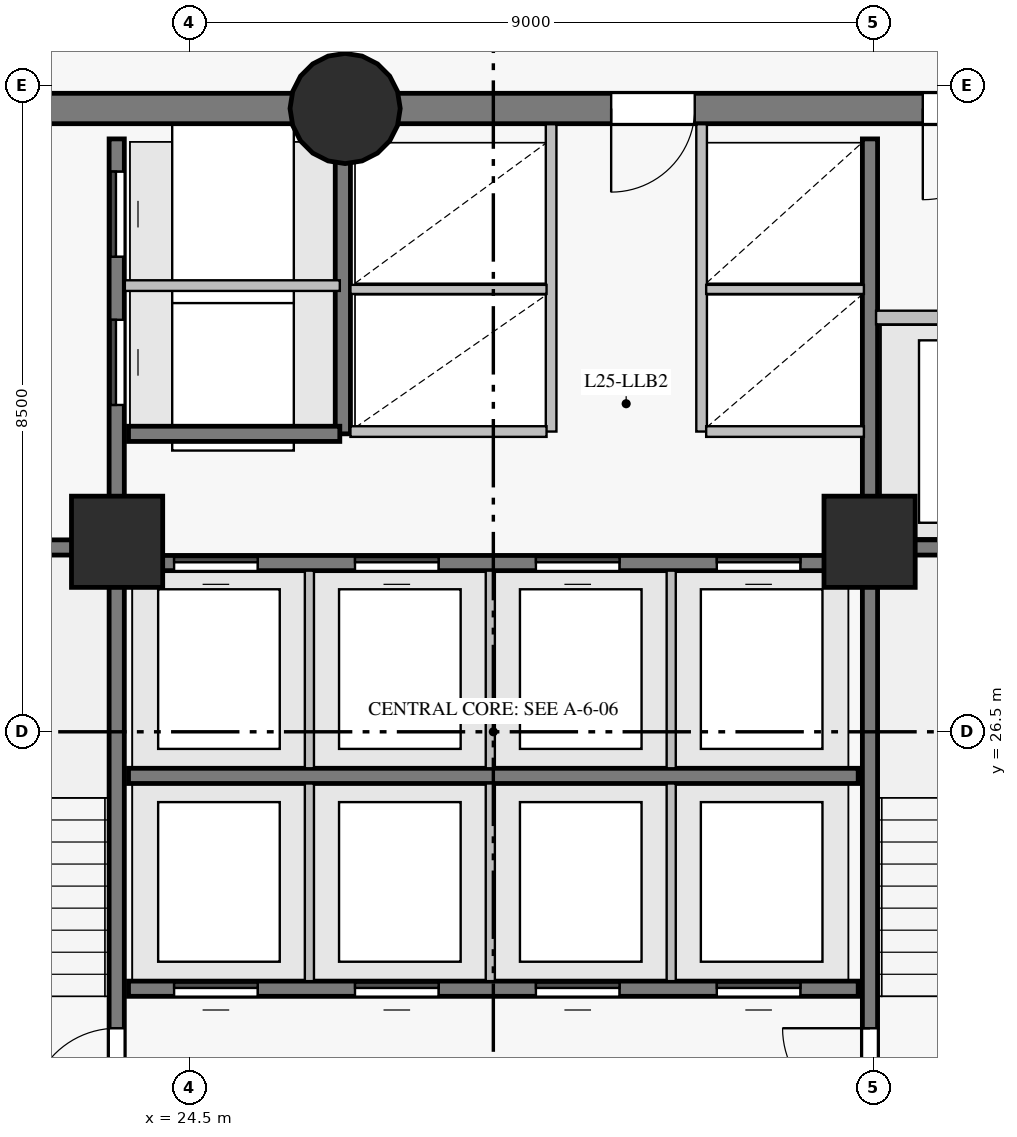
"""IFC4 building model, lengths in metres.
Left out: names, types, materials, properties, quantities, classifications, styles, units other than length and angle.
Written with IfcOpenShell. Run it as: python <this file> out.ifc"""

import sys

from ifc_helpers import new_model, si_unit, direction, frame, frame_2d, origin, origin_with_axes, origin_2d, place, context, subcontext, project, spatial, rectangle, circle, extrude, source, transform, mapped, element, fill, save


model = new_model("IFC4")
c1 = context("Model", 3, precision=1e-05, world=origin(), true_north=direction((0.0, 1.0)))
c2 = subcontext(c1, "Body", "Model", "MODEL_VIEW")
j1 = project(units=[si_unit("LENGTHUNIT", "METRE"), si_unit("PLANEANGLEUNIT", "RADIAN")], contexts=[c1])
p1 = place(None, origin())
s1 = spatial("IfcSite", under=j1, at=p1, CompositionType="ELEMENT")
p2 = place(p1, origin())
s2 = spatial("IfcBuilding", under=s1, at=p2, CompositionType="ELEMENT")
p3 = place(p2, frame((0.0, 0.0, 96.2)))
s3 = spatial("IfcBuildingStorey", under=s2, at=p3, CompositionType="ELEMENT", Elevation=96.2)
p4 = place(p3, frame((37.5, 34.7, 0.0), z_axis=(0.0, 0.0, 1.0), x_axis=(-1.0, 0.0, 0.0)))
e1 = element("IfcWall", 1, at=p4, inside=s3, PredefinedType="SHEAR", context=c2, shape_type="SweptSolid", body=[
    extrude(rectangle(XDim=10.95, YDim=0.4, at=frame_2d((5.475, 0.0))), origin(), (0.0, 0.0, 1.0), 2.825),
])
p5 = place(p4, frame((2.15, 0.0, 0.0)))
e2 = element("IfcOpeningElement", 2, at=p5, cuts=e1, PredefinedType="OPENING", context=c2, shape_type="SweptSolid", body=[
    extrude(rectangle(XDim=1.2, YDim=2.15, at=frame_2d((0.6, 1.075))), frame((0.0, 0.21, 0.0), z_axis=(0.0, -1.0, 0.0), x_axis=(1.0, 0.0, 0.0)), (0.0, 0.0, 1.0), 0.42),
])
p6 = place(p4, frame((6.35, 0.0, 0.0)))
e3 = element("IfcOpeningElement", 3, at=p6, cuts=e1, PredefinedType="OPENING", context=c2, shape_type="SweptSolid", body=[
    extrude(rectangle(XDim=1.1, YDim=2.15, at=frame_2d((0.55, 1.075))), frame((0.0, 0.21, 0.0), z_axis=(0.0, -1.0, 0.0), x_axis=(1.0, 0.0, 0.0)), (0.0, 0.0, 1.0), 0.42),
])
p7 = place(p3, frame((26.55, 34.7, 0.0), z_axis=(0.0, 0.0, 1.0), x_axis=(-1.0, 0.0, 0.0)))
e4 = element("IfcWall", 4, at=p7, inside=s3, PredefinedType="SHEAR", context=c2, shape_type="SweptSolid", body=[
    extrude(rectangle(XDim=7.05, YDim=0.4, at=frame_2d((3.525, 0.0))), origin(), (0.0, 0.0, 1.0), 2.825),
])
p8 = place(p7, frame((4.25, 0.0, 0.0)))
e5 = element("IfcOpeningElement", 5, at=p8, cuts=e4, PredefinedType="OPENING", context=c2, shape_type="SweptSolid", body=[
    extrude(rectangle(XDim=1.1, YDim=2.15, at=frame_2d((0.55, 1.075))), frame((0.0, 0.21, 0.0), z_axis=(0.0, -1.0, 0.0), x_axis=(1.0, 0.0, 0.0)), (0.0, 0.0, 1.0), 0.42),
])
m1 = source(origin_with_axes(), c2, "Body", "SweptSolid", [
    extrude(circle(Radius=0.725, at=origin_2d()), origin(), (0.0, 0.0, 1.0), 3.05),
])
p9 = place(p3, frame((26.55, 34.7, 0.0), z_axis=(0.0, 0.0, 1.0), x_axis=(1.0, 0.0, 0.0)))
e6 = element("IfcColumn", 6, at=p9, inside=s3, PredefinedType="COLUMN", context=c2, shape_type="MappedRepresentation", body=[
    mapped(m1, transform((0.0, 0.0, 0.0), scale=1.0)),
])
m2 = source(origin_with_axes(), c2, "Body", "SweptSolid", [
    extrude(rectangle(XDim=1.2, YDim=1.2, at=origin_2d()), origin(), (0.0, 0.0, 1.0), 3.05),
])
for number, where, z_axis, x_axis in (
    (7, (23.55, 29.0, 0.0), (0.0, 0.0, 1.0), (1.0, 0.0, 0.0)),
    (8, (33.45, 29.0, 0.0), (0.0, 0.0, 1.0), (1.0, 0.0, 0.0)),
):
    element("IfcColumn", number, at=place(p3, frame(where, z_axis=z_axis, x_axis=x_axis)), inside=s3, PredefinedType="COLUMN", context=c2, shape_type="MappedRepresentation", body=[
        mapped(m2, transform((0.0, 0.0, 0.0), scale=1.0)),
    ])
p10 = place(p3, frame((23.545, 18.7, 0.0), z_axis=(0.0, 0.0, 1.0), x_axis=(0.0, 1.0, 0.0)))
e9 = element("IfcWall", 9, at=p10, inside=s3, PredefinedType="SHEAR", context=c2, shape_type="SweptSolid", body=[
    extrude(rectangle(XDim=15.6, YDim=0.2, at=frame_2d((7.8, 0.0))), origin(), (0.0, 0.0, 1.0), 2.825),
])
p11 = place(p10, frame((2.75, 0.0, 0.0)))
e10 = element("IfcOpeningElement", 10, at=p11, cuts=e9, PredefinedType="OPENING", context=c2, shape_type="SweptSolid", body=[
    extrude(rectangle(XDim=1.15, YDim=2.15, at=frame_2d((0.575, 1.075))), frame((0.0, 0.11, 0.0), z_axis=(0.0, -1.0, 0.0), x_axis=(1.0, 0.0, 0.0)), (0.0, 0.0, 1.0), 0.22),
])
p12 = place(p10, frame((0.14, 0.0, 0.0)))
e11 = element("IfcOpeningElement", 11, at=p12, cuts=e9, PredefinedType="OPENING", context=c2, shape_type="SweptSolid", body=[
    extrude(rectangle(XDim=0.88, YDim=2.1, at=frame_2d((0.44, 1.05))), frame((0.0, 0.11, 0.0), z_axis=(0.0, -1.0, 0.0), x_axis=(1.0, 0.0, 0.0)), (0.0, 0.0, 1.0), 0.22),
])
p13 = place(p10, frame((1.36, 0.0, 0.0)))
e12 = element("IfcOpeningElement", 12, at=p13, cuts=e9, PredefinedType="OPENING", context=c2, shape_type="SweptSolid", body=[
    extrude(rectangle(XDim=0.88, YDim=2.1, at=frame_2d((0.44, 1.05))), frame((0.0, 0.11, 0.0), z_axis=(0.0, -1.0, 0.0), x_axis=(1.0, 0.0, 0.0)), (0.0, 0.0, 1.0), 0.22),
])
p14 = place(p10, frame((12.1, 0.0, 0.0)))
e13 = element("IfcOpeningElement", 13, at=p14, cuts=e9, PredefinedType="OPENING", context=c2, shape_type="SweptSolid", body=[
    extrude(rectangle(XDim=1.12, YDim=2.15, at=frame_2d((0.56, 1.075))), frame((0.0, 0.11, 0.0), z_axis=(0.0, -1.0, 0.0), x_axis=(1.0, 0.0, 0.0)), (0.0, 0.0, 1.0), 0.22),
])
p15 = place(p10, frame((14.05, 0.0, 0.0)))
e14 = element("IfcOpeningElement", 14, at=p15, cuts=e9, PredefinedType="OPENING", context=c2, shape_type="SweptSolid", body=[
    extrude(rectangle(XDim=1.12, YDim=2.15, at=frame_2d((0.56, 1.075))), frame((0.0, 0.11, 0.0), z_axis=(0.0, -1.0, 0.0), x_axis=(1.0, 0.0, 0.0)), (0.0, 0.0, 1.0), 0.22),
])
p16 = place(p3, frame((33.455, 18.7, 0.0), z_axis=(0.0, 0.0, 1.0), x_axis=(0.0, 1.0, 0.0)))
e15 = element("IfcWall", 15, at=p16, inside=s3, PredefinedType="SHEAR", context=c2, shape_type="SweptSolid", body=[
    extrude(rectangle(XDim=15.6, YDim=0.2, at=frame_2d((7.8, 0.0))), origin(), (0.0, 0.0, 1.0), 2.825),
])
p17 = place(p16, frame((2.75, 0.0, 0.0)))
e16 = element("IfcOpeningElement", 16, at=p17, cuts=e15, PredefinedType="OPENING", context=c2, shape_type="SweptSolid", body=[
    extrude(rectangle(XDim=1.15, YDim=2.15, at=frame_2d((0.575, 1.075))), frame((0.0, 0.11, 0.0), z_axis=(0.0, -1.0, 0.0), x_axis=(1.0, 0.0, 0.0)), (0.0, 0.0, 1.0), 0.22),
])
p18 = place(p16, frame((0.55, 0.0, 0.0)))
e17 = element("IfcOpeningElement", 17, at=p18, cuts=e15, PredefinedType="OPENING", context=c2, shape_type="SweptSolid", body=[
    extrude(rectangle(XDim=0.94, YDim=2.1, at=frame_2d((0.47, 1.05))), frame((0.0, 0.11, 0.0), z_axis=(0.0, -1.0, 0.0), x_axis=(1.0, 0.0, 0.0)), (0.0, 0.0, 1.0), 0.22),
])
p19 = place(p3, frame((23.7, 23.12, 0.0), z_axis=(0.0, 0.0, 1.0), x_axis=(1.0, 0.0, 0.0)))
e18 = element("IfcWall", 18, at=p19, inside=s3, PredefinedType="SHEAR", context=c2, shape_type="SweptSolid", body=[
    extrude(rectangle(XDim=9.6, YDim=0.2, at=frame_2d((4.8, 0.0))), origin(), (0.0, 0.0, 1.0), 2.825),
])
p20 = place(p19, frame((0.6, 0.0, 0.0)))
e19 = element("IfcOpeningElement", 19, at=p20, cuts=e18, PredefinedType="OPENING", context=c2, shape_type="SweptSolid", body=[
    extrude(rectangle(XDim=1.1, YDim=2.15, at=frame_2d((0.55, 1.075))), frame((0.0, 0.11, 0.0), z_axis=(0.0, -1.0, 0.0), x_axis=(1.0, 0.0, 0.0)), (0.0, 0.0, 1.0), 0.22),
])
p21 = place(p19, frame((2.98, 0.0, 0.0)))
e20 = element("IfcOpeningElement", 20, at=p21, cuts=e18, PredefinedType="OPENING", context=c2, shape_type="SweptSolid", body=[
    extrude(rectangle(XDim=1.1, YDim=2.15, at=frame_2d((0.55, 1.075))), frame((0.0, 0.11, 0.0), z_axis=(0.0, -1.0, 0.0), x_axis=(1.0, 0.0, 0.0)), (0.0, 0.0, 1.0), 0.22),
])
p22 = place(p19, frame((5.36, 0.0, 0.0)))
e21 = element("IfcOpeningElement", 21, at=p22, cuts=e18, PredefinedType="OPENING", context=c2, shape_type="SweptSolid", body=[
    extrude(rectangle(XDim=1.1, YDim=2.15, at=frame_2d((0.55, 1.075))), frame((0.0, 0.11, 0.0), z_axis=(0.0, -1.0, 0.0), x_axis=(1.0, 0.0, 0.0)), (0.0, 0.0, 1.0), 0.22),
])
p23 = place(p19, frame((7.74, 0.0, 0.0)))
e22 = element("IfcOpeningElement", 22, at=p23, cuts=e18, PredefinedType="OPENING", context=c2, shape_type="SweptSolid", body=[
    extrude(rectangle(XDim=1.1, YDim=2.15, at=frame_2d((0.55, 1.075))), frame((0.0, 0.11, 0.0), z_axis=(0.0, -1.0, 0.0), x_axis=(1.0, 0.0, 0.0)), (0.0, 0.0, 1.0), 0.22),
])
p24 = place(p3, frame((23.7, 25.92, 0.0), z_axis=(0.0, 0.0, 1.0), x_axis=(1.0, 0.0, 0.0)))
e23 = element("IfcWall", 23, at=p24, inside=s3, PredefinedType="SHEAR", context=c2, shape_type="SweptSolid", body=[
    extrude(rectangle(XDim=9.6, YDim=0.2, at=frame_2d((4.8, 0.0))), origin(), (0.0, 0.0, 1.0), 2.825),
])
p25 = place(p3, frame((23.7, 28.72, 0.0), z_axis=(0.0, 0.0, 1.0), x_axis=(1.0, 0.0, 0.0)))
e24 = element("IfcWall", 24, at=p25, inside=s3, PredefinedType="SHEAR", context=c2, shape_type="SweptSolid", body=[
    extrude(rectangle(XDim=9.6, YDim=0.2, at=frame_2d((4.8, 0.0))), origin(), (0.0, 0.0, 1.0), 2.825),
])
p26 = place(p25, frame((0.6, 0.0, 0.0)))
e25 = element("IfcOpeningElement", 25, at=p26, cuts=e24, PredefinedType="OPENING", context=c2, shape_type="SweptSolid", body=[
    extrude(rectangle(XDim=1.1, YDim=2.15, at=frame_2d((0.55, 1.075))), frame((0.0, 0.11, 0.0), z_axis=(0.0, -1.0, 0.0), x_axis=(1.0, 0.0, 0.0)), (0.0, 0.0, 1.0), 0.22),
])
p27 = place(p25, frame((2.98, 0.0, 0.0)))
e26 = element("IfcOpeningElement", 26, at=p27, cuts=e24, PredefinedType="OPENING", context=c2, shape_type="SweptSolid", body=[
    extrude(rectangle(XDim=1.1, YDim=2.15, at=frame_2d((0.55, 1.075))), frame((0.0, 0.11, 0.0), z_axis=(0.0, -1.0, 0.0), x_axis=(1.0, 0.0, 0.0)), (0.0, 0.0, 1.0), 0.22),
])
p28 = place(p25, frame((5.36, 0.0, 0.0)))
e27 = element("IfcOpeningElement", 27, at=p28, cuts=e24, PredefinedType="OPENING", context=c2, shape_type="SweptSolid", body=[
    extrude(rectangle(XDim=1.1, YDim=2.15, at=frame_2d((0.55, 1.075))), frame((0.0, 0.11, 0.0), z_axis=(0.0, -1.0, 0.0), x_axis=(1.0, 0.0, 0.0)), (0.0, 0.0, 1.0), 0.22),
])
p29 = place(p25, frame((7.74, 0.0, 0.0)))
e28 = element("IfcOpeningElement", 28, at=p29, cuts=e24, PredefinedType="OPENING", context=c2, shape_type="SweptSolid", body=[
    extrude(rectangle(XDim=1.1, YDim=2.15, at=frame_2d((0.55, 1.075))), frame((0.0, 0.11, 0.0), z_axis=(0.0, -1.0, 0.0), x_axis=(1.0, 0.0, 0.0)), (0.0, 0.0, 1.0), 0.22),
])
for number, where, z_axis, x_axis in (
    (29, (33.455, 28.925, 0.0), (0.0, 0.0, 1.0), (1.0, 0.0, 0.0)),
    (30, (19.55, 28.925, 0.0), (0.0, 0.0, 1.0), (1.0, 0.0, 0.0)),
):
    element("IfcWall", number, at=place(p3, frame(where, z_axis=z_axis, x_axis=x_axis)), inside=s3, PredefinedType="SHEAR", context=c2, shape_type="SweptSolid", body=[
        extrude(rectangle(XDim=3.995, YDim=0.2, at=frame_2d((1.998, 0.0))), origin(), (0.0, 0.0, 1.0), 2.825),
    ])
p30 = place(p3, frame((26.52, 30.42, 0.0), z_axis=(0.0, 0.0, 1.0), x_axis=(0.0, 1.0, 0.0)))
e31 = element("IfcWall", 31, at=p30, inside=s3, PredefinedType="SHEAR", context=c2, shape_type="SweptSolid", body=[
    extrude(rectangle(XDim=3.86, YDim=0.2, at=frame_2d((1.93, 0.0))), origin(), (0.0, 0.0, 1.0), 2.825),
])
p31 = place(p3, frame((23.7, 30.42, 0.0), z_axis=(0.0, 0.0, 1.0), x_axis=(1.0, 0.0, 0.0)))
e32 = element("IfcWall", 32, at=p31, inside=s3, PredefinedType="SHEAR", context=c2, shape_type="SweptSolid", body=[
    extrude(rectangle(XDim=2.78, YDim=0.2, at=frame_2d((1.39, 0.0))), origin(), (0.0, 0.0, 1.0), 2.825),
])
for number, where, z_axis, x_axis in (
    (33, (29.26, 30.45, 0.0), (0.0, 0.0, 1.0), (0.0, 1.0, 0.0)),
    (34, (31.24, 30.45, 0.0), (0.0, 0.0, 1.0), (0.0, 1.0, 0.0)),
):
    element("IfcWall", number, at=place(p3, frame(where, z_axis=z_axis, x_axis=x_axis)), inside=s3, PredefinedType="PARTITIONING", context=c2, shape_type="SweptSolid", body=[
        extrude(rectangle(XDim=4.043, YDim=0.14, at=frame_2d((2.021, 0.0))), origin(), (0.0, 0.0, 1.0), 2.825),
    ])
p32 = place(p3, frame((33.535, 31.95, 0.0), z_axis=(0.0, 0.0, 1.0), x_axis=(1.0, 0.0, 0.0)))
e35 = element("IfcWall", 35, at=p32, inside=s3, PredefinedType="PARTITIONING", context=c2, shape_type="SweptSolid", body=[
    extrude(rectangle(XDim=3.759, YDim=0.18, at=frame_2d((1.879, 0.0))), origin(), (0.0, 0.0, 1.0), 2.825),
])
p33 = place(p32, frame((0.9, 0.0, 0.0)))
e36 = element("IfcOpeningElement", 36, at=p33, cuts=e35, PredefinedType="OPENING", context=c2, shape_type="SweptSolid", body=[
    extrude(rectangle(XDim=1.3, YDim=2.2, at=frame_2d((0.65, 1.1))), frame((0.0, 0.1, 0.0), z_axis=(0.0, -1.0, 0.0), x_axis=(1.0, 0.0, 0.0)), (0.0, 0.0, 1.0), 0.2),
])
p34 = place(p3, frame((23.652, 32.37, 0.0), z_axis=(0.0, 0.0, 1.0), x_axis=(1.0, 0.0, 0.0)))
e37 = element("IfcWall", 37, at=p34, inside=s3, PredefinedType="PARTITIONING", context=c2, shape_type="SweptSolid", body=[
    extrude(rectangle(XDim=2.828, YDim=0.14, at=frame_2d((1.414, 0.0))), origin(), (0.0, 0.0, 1.0), 2.825),
])
for number, where, z_axis, x_axis in (
    (38, (26.08, 23.22, 0.0), (0.0, 0.0, 1.0), (0.0, 1.0, 0.0)),
    (39, (28.46, 23.22, 0.0), (0.0, 0.0, 1.0), (0.0, 1.0, 0.0)),
    (40, (30.84, 23.22, 0.0), (0.0, 0.0, 1.0), (0.0, 1.0, 0.0)),
    (41, (26.08, 26.02, 0.0), (0.0, 0.0, 1.0), (0.0, 1.0, 0.0)),
    (42, (28.46, 26.02, 0.0), (0.0, 0.0, 1.0), (0.0, 1.0, 0.0)),
    (43, (30.84, 26.02, 0.0), (0.0, 0.0, 1.0), (0.0, 1.0, 0.0)),
):
    element("IfcWall", number, at=place(p3, frame(where, z_axis=z_axis, x_axis=x_axis)), inside=s3, PredefinedType="PARTITIONING", context=c2, shape_type="SweptSolid", body=[
        extrude(rectangle(XDim=2.6, YDim=0.12, at=frame_2d((1.3, 0.0))), origin(), (0.0, 0.0, 1.0), 2.825),
    ])
p35 = place(p3, frame((26.62, 30.45, 0.0), z_axis=(0.0, 0.0, 1.0), x_axis=(1.0, 0.0, 0.0)))
e44 = element("IfcWall", 44, at=p35, inside=s3, PredefinedType="PARTITIONING", context=c2, shape_type="SweptSolid", body=[
    extrude(rectangle(XDim=2.58, YDim=0.14, at=frame_2d((1.29, 0.0))), origin(), (0.0, 0.0, 1.0), 2.825),
])
p36 = place(p3, frame((26.62, 32.32, 0.0), z_axis=(0.0, 0.0, 1.0), x_axis=(1.0, 0.0, 0.0)))
e45 = element("IfcWall", 45, at=p36, inside=s3, PredefinedType="PARTITIONING", context=c2, shape_type="SweptSolid", body=[
    extrude(rectangle(XDim=2.58, YDim=0.12, at=frame_2d((1.29, 0.0))), origin(), (0.0, 0.0, 1.0), 2.825),
])
p37 = place(p3, frame((31.3, 30.45, 0.0), z_axis=(0.0, 0.0, 1.0), x_axis=(1.0, 0.0, 0.0)))
e46 = element("IfcWall", 46, at=p37, inside=s3, PredefinedType="PARTITIONING", context=c2, shape_type="SweptSolid", body=[
    extrude(rectangle(XDim=2.075, YDim=0.14, at=frame_2d((1.038, 0.0))), origin(), (0.0, 0.0, 1.0), 2.825),
])
p38 = place(p3, frame((31.3, 32.32, 0.0), z_axis=(0.0, 0.0, 1.0), x_axis=(1.0, 0.0, 0.0)))
e47 = element("IfcWall", 47, at=p38, inside=s3, PredefinedType="PARTITIONING", context=c2, shape_type="SweptSolid", body=[
    extrude(rectangle(XDim=2.075, YDim=0.12, at=frame_2d((1.038, 0.0))), origin(), (0.0, 0.0, 1.0), 2.825),
])
m3 = source(origin_with_axes(), c2, "Body", "SweptSolid", [
    extrude(rectangle(XDim=1.15, YDim=2.15, at=frame_2d((0.575, 1.075))), frame((0.0, 0.025, 0.0), z_axis=(0.0, -1.0, 0.0), x_axis=(1.0, 0.0, 0.0)), (0.0, 0.0, 1.0), 0.05),
])
p39 = place(p11, origin())
e48 = element("IfcDoor", 48, at=p39, inside=s3, OperationType="SINGLE_SWING_LEFT", PredefinedType="DOOR", context=c2, shape_type="MappedRepresentation", body=[
    mapped(m3, transform((0.0, 0.0, 0.0), scale=1.0)),
])
fill(e10, e48)
p40 = place(p17, origin())
e49 = element("IfcDoor", 49, at=p40, inside=s3, OperationType="SINGLE_SWING_RIGHT", PredefinedType="DOOR", context=c2, shape_type="MappedRepresentation", body=[
    mapped(m3, transform((0.0, 0.0, 0.0), scale=1.0)),
])
fill(e16, e49)
m4 = source(origin_with_axes(), c2, "Body", "SweptSolid", [
    extrude(rectangle(XDim=1.2, YDim=2.15, at=frame_2d((0.6, 1.075))), frame((0.0, 0.025, 0.0), z_axis=(0.0, -1.0, 0.0), x_axis=(1.0, 0.0, 0.0)), (0.0, 0.0, 1.0), 0.05),
])
p41 = place(p5, origin())
e50 = element("IfcDoor", 50, at=p41, inside=s3, OperationType="SINGLE_SWING_RIGHT", PredefinedType="DOOR", context=c2, shape_type="MappedRepresentation", body=[
    mapped(m4, transform((0.0, 0.0, 0.0), scale=1.0)),
])
fill(e2, e50)
m5 = source(origin_with_axes(), c2, "Body", "SweptSolid", [
    extrude(rectangle(XDim=1.1, YDim=2.15, at=frame_2d((0.55, 1.075))), frame((0.0, 0.025, 0.0), z_axis=(0.0, -1.0, 0.0), x_axis=(1.0, 0.0, 0.0)), (0.0, 0.0, 1.0), 0.05),
])
p42 = place(p20, origin())
e51 = element("IfcDoor", 51, at=p42, inside=s3, OperationType="SLIDING_TO_LEFT", PredefinedType="DOOR", context=c2, shape_type="MappedRepresentation", body=[
    mapped(m5, transform((0.0, 0.0, 0.0), scale=1.0)),
])
fill(e19, e51)
p43 = place(p21, origin())
e52 = element("IfcDoor", 52, at=p43, inside=s3, OperationType="SLIDING_TO_RIGHT", PredefinedType="DOOR", context=c2, shape_type="MappedRepresentation", body=[
    mapped(m5, transform((0.0, 0.0, 0.0), scale=1.0)),
])
fill(e20, e52)
p44 = place(p22, origin())
e53 = element("IfcDoor", 53, at=p44, inside=s3, OperationType="SLIDING_TO_LEFT", PredefinedType="DOOR", context=c2, shape_type="MappedRepresentation", body=[
    mapped(m5, transform((0.0, 0.0, 0.0), scale=1.0)),
])
fill(e21, e53)
p45 = place(p23, origin())
e54 = element("IfcDoor", 54, at=p45, inside=s3, OperationType="SLIDING_TO_RIGHT", PredefinedType="DOOR", context=c2, shape_type="MappedRepresentation", body=[
    mapped(m5, transform((0.0, 0.0, 0.0), scale=1.0)),
])
fill(e22, e54)
p46 = place(p26, origin())
e55 = element("IfcDoor", 55, at=p46, inside=s3, OperationType="SLIDING_TO_LEFT", PredefinedType="DOOR", context=c2, shape_type="MappedRepresentation", body=[
    mapped(m5, transform((0.0, 0.0, 0.0), scale=1.0)),
])
fill(e25, e55)
p47 = place(p27, origin())
e56 = element("IfcDoor", 56, at=p47, inside=s3, OperationType="SLIDING_TO_RIGHT", PredefinedType="DOOR", context=c2, shape_type="MappedRepresentation", body=[
    mapped(m5, transform((0.0, 0.0, 0.0), scale=1.0)),
])
fill(e26, e56)
p48 = place(p28, origin())
e57 = element("IfcDoor", 57, at=p48, inside=s3, OperationType="SLIDING_TO_LEFT", PredefinedType="DOOR", context=c2, shape_type="MappedRepresentation", body=[
    mapped(m5, transform((0.0, 0.0, 0.0), scale=1.0)),
])
fill(e27, e57)
p49 = place(p29, origin())
e58 = element("IfcDoor", 58, at=p49, inside=s3, OperationType="SLIDING_TO_RIGHT", PredefinedType="DOOR", context=c2, shape_type="MappedRepresentation", body=[
    mapped(m5, transform((0.0, 0.0, 0.0), scale=1.0)),
])
fill(e28, e58)
p50 = place(p6, origin())
e59 = element("IfcDoor", 59, at=p50, inside=s3, OperationType="SINGLE_SWING_RIGHT", PredefinedType="DOOR", context=c2, shape_type="MappedRepresentation", body=[
    mapped(m5, transform((0.0, 0.0, 0.0), scale=1.0)),
])
fill(e3, e59)
m6 = source(origin_with_axes(), c2, "Body", "SweptSolid", [
    extrude(rectangle(XDim=1.12, YDim=2.15, at=frame_2d((0.56, 1.075))), frame((0.0, 0.025, 0.0), z_axis=(0.0, -1.0, 0.0), x_axis=(1.0, 0.0, 0.0)), (0.0, 0.0, 1.0), 0.05),
])
p51 = place(p14, origin())
e60 = element("IfcDoor", 60, at=p51, inside=s3, OperationType="SLIDING_TO_LEFT", PredefinedType="DOOR", context=c2, shape_type="MappedRepresentation", body=[
    mapped(m6, transform((0.0, 0.0, 0.0), scale=1.0)),
])
fill(e13, e60)
p52 = place(p15, origin())
e61 = element("IfcDoor", 61, at=p52, inside=s3, OperationType="SLIDING_TO_RIGHT", PredefinedType="DOOR", context=c2, shape_type="MappedRepresentation", body=[
    mapped(m6, transform((0.0, 0.0, 0.0), scale=1.0)),
])
fill(e14, e61)
save(model, sys.argv[1])
